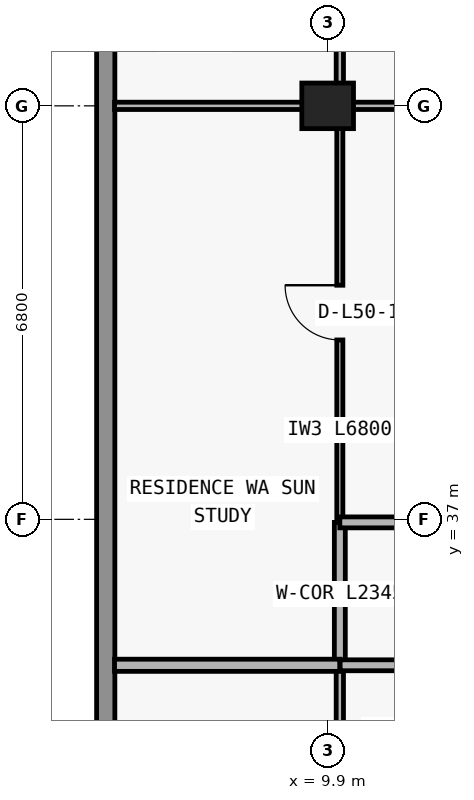
"""IFC4 building model, lengths in metres.
Left out: names, types, materials, properties, quantities, classifications, styles, units other than length and angle.
Written with IfcOpenShell. Run it as: python <this file> out.ifc"""

import sys

from ifc_helpers import new_model, si_unit, direction, frame, frame_2d, origin, origin_2d, place, context, subcontext, project, spatial, rectangle, extrude, element, fill, save


model = new_model("IFC4")
c1 = context("Model", 3, precision=1e-05, world=origin(), true_north=direction((0.0, 1.0)))
c2 = subcontext(c1, "Body", "Model", "MODEL_VIEW")
j1 = project(units=[si_unit("LENGTHUNIT", "METRE"), si_unit("PLANEANGLEUNIT", "RADIAN")], contexts=[c1])
p1 = place(None, origin())
s1 = spatial("IfcSite", under=j1, at=p1, CompositionType="ELEMENT")
p2 = place(p1, origin())
s2 = spatial("IfcBuilding", under=s1, at=p2, CompositionType="ELEMENT")
p3 = place(p2, frame((0.0, 0.0, 180.3)))
s3 = spatial("IfcBuildingStorey", under=s2, at=p3, CompositionType="ELEMENT", Elevation=180.3)
p4 = place(p3, frame((9.9, 43.8, 0.0), z_axis=(0.0, 0.0, 1.0), x_axis=(1.0, 0.0, 0.0)))
e1 = element("IfcColumn", 1, at=p4, inside=s3, PredefinedType="COLUMN", context=c2, shape_type="SweptSolid", body=[
    extrude(rectangle(XDim=0.85, YDim=0.75, at=origin_2d()), origin(), (0.0, 0.0, 1.0), 3.0),
])
p5 = place(p3, frame((6.25, 29.1, 0.0), z_axis=(0.0, 0.0, 1.0), x_axis=(0.0, 1.0, 0.0)))
e2 = element("IfcWall", 2, at=p5, inside=s3, PredefinedType="STANDARD", context=c2, shape_type="SweptSolid", body=[
    extrude(rectangle(XDim=17.9, YDim=0.3, at=frame_2d((8.95, 0.0))), origin(), (0.0, 0.0, 1.0), 3.0),
])
p6 = place(p3, frame((10.1, 30.34, 0.0), z_axis=(0.0, 0.0, 1.0), x_axis=(0.0, 1.0, 0.0)))
e3 = element("IfcWall", 3, at=p6, inside=s3, PredefinedType="PARTITIONING", context=c2, shape_type="SweptSolid", body=[
    extrude(rectangle(XDim=4.26, YDim=0.12, at=frame_2d((2.13, 0.0))), origin(), (0.0, 0.0, 1.0), 2.213),
])
p7 = place(p3, frame((10.1, 34.605, 0.0), z_axis=(0.0, 0.0, 1.0), x_axis=(0.0, 1.0, 0.0)))
e4 = element("IfcWall", 4, at=p7, inside=s3, PredefinedType="PARTITIONING", context=c2, shape_type="SweptSolid", body=[
    extrude(rectangle(XDim=2.345, YDim=0.18, at=frame_2d((1.172, 0.0))), origin(), (0.0, 0.0, 1.0), 2.213),
])
p8 = place(p3, frame((10.1, 37.0, 0.0), z_axis=(0.0, 0.0, 1.0), x_axis=(0.0, 1.0, 0.0)))
e5 = element("IfcWall", 5, at=p8, inside=s3, PredefinedType="MOVABLE", context=c2, shape_type="SweptSolid", body=[
    extrude(rectangle(XDim=6.8, YDim=0.1, at=frame_2d((3.4, 0.0))), origin(), (0.0, 0.0, 1.0), 2.213),
])
p9 = place(p8, frame((2.95, 0.0, 0.0)))
e6 = element("IfcOpeningElement", 6, at=p9, cuts=e5, PredefinedType="OPENING", context=c2, shape_type="SweptSolid", body=[
    extrude(rectangle(XDim=0.9, YDim=2.15, at=frame_2d((0.45, 1.075))), frame((0.0, 0.06, 0.0), z_axis=(0.0, -1.0, 0.0), x_axis=(1.0, 0.0, 0.0)), (0.0, 0.0, 1.0), 0.12),
])
p10 = place(p3, frame((10.1, 43.805, 0.0), z_axis=(0.0, 0.0, 1.0), x_axis=(0.0, 1.0, 0.0)))
e7 = element("IfcWall", 7, at=p10, inside=s3, PredefinedType="PARTITIONING", context=c2, shape_type="SweptSolid", body=[
    extrude(rectangle(XDim=3.075, YDim=0.12, at=frame_2d((1.538, 0.0))), origin(), (0.0, 0.0, 1.0), 3.0),
])
p11 = place(p10, frame((1.087, 0.0, 0.0)))
e8 = element("IfcOpeningElement", 8, at=p11, cuts=e7, PredefinedType="OPENING", context=c2, shape_type="SweptSolid", body=[
    extrude(rectangle(XDim=0.9, YDim=2.15, at=frame_2d((0.45, 1.075))), frame((0.0, 0.07, 0.0), z_axis=(0.0, -1.0, 0.0), x_axis=(1.0, 0.0, 0.0)), (0.0, 0.0, 1.0), 0.14),
])
p12 = place(p3, frame((6.395, 34.6, 0.0), z_axis=(0.0, 0.0, 1.0), x_axis=(1.0, 0.0, 0.0)))
e9 = element("IfcWall", 9, at=p12, inside=s3, PredefinedType="PARTITIONING", context=c2, shape_type="SweptSolid", body=[
    extrude(rectangle(XDim=3.705, YDim=0.2, at=frame_2d((1.853, 0.0))), origin(), (0.0, 0.0, 1.0), 3.0),
])
p13 = place(p3, frame((10.105, 34.6, 0.0), z_axis=(0.0, 0.0, 1.0), x_axis=(1.0, 0.0, 0.0)))
e10 = element("IfcWall", 10, at=p13, inside=s3, PredefinedType="PARTITIONING", context=c2, shape_type="SweptSolid", body=[
    extrude(rectangle(XDim=8.145, YDim=0.18, at=frame_2d((4.073, 0.0))), origin(), (0.0, 0.0, 1.0), 3.0),
])
p14 = place(p13, frame((2.388, 0.0, 0.0)))
e11 = element("IfcOpeningElement", 11, at=p14, cuts=e10, PredefinedType="OPENING", context=c2, shape_type="SweptSolid", body=[
    extrude(rectangle(XDim=1.0, YDim=2.2, at=frame_2d((0.5, 1.1))), frame((0.0, 0.1, 0.0), z_axis=(0.0, -1.0, 0.0), x_axis=(1.0, 0.0, 0.0)), (0.0, 0.0, 1.0), 0.2),
])
p15 = place(p3, frame((10.1, 36.95, 0.0), z_axis=(0.0, 0.0, 1.0), x_axis=(1.0, 0.0, 0.0)))
e12 = element("IfcWall", 12, at=p15, inside=s3, PredefinedType="PARTITIONING", context=c2, shape_type="SweptSolid", body=[
    extrude(rectangle(XDim=7.845, YDim=0.18, at=frame_2d((3.922, 0.0))), origin(), (0.0, 0.0, 1.0), 3.0),
])
p16 = place(p15, frame((3.46, 0.0, 0.0)))
e13 = element("IfcOpeningElement", 13, at=p16, cuts=e12, PredefinedType="OPENING", context=c2, shape_type="SweptSolid", body=[
    extrude(rectangle(XDim=1.0, YDim=2.2, at=frame_2d((0.5, 1.1))), frame((0.0, 0.1, 0.0), z_axis=(0.0, -1.0, 0.0), x_axis=(1.0, 0.0, 0.0)), (0.0, 0.0, 1.0), 0.2),
])
p17 = place(p3, frame((6.395, 43.8, 0.0), z_axis=(0.0, 0.0, 1.0), x_axis=(1.0, 0.0, 0.0)))
e14 = element("IfcWall", 14, at=p17, inside=s3, PredefinedType="PARTITIONING", context=c2, shape_type="SweptSolid", body=[
    extrude(rectangle(XDim=11.56, YDim=0.12, at=frame_2d((5.78, 0.0))), origin(), (0.0, 0.0, 1.0), 2.368),
])
p18 = place(p17, frame((7.215, 0.0, 0.0)))
e15 = element("IfcOpeningElement", 15, at=p18, cuts=e14, PredefinedType="OPENING", context=c2, shape_type="SweptSolid", body=[
    extrude(rectangle(XDim=0.9, YDim=2.15, at=frame_2d((0.45, 1.075))), frame((0.0, 0.07, 0.0), z_axis=(0.0, -1.0, 0.0), x_axis=(1.0, 0.0, 0.0)), (0.0, 0.0, 1.0), 0.14),
])
p19 = place(p17, frame((9.958, 0.0, 0.0)))
e16 = element("IfcOpeningElement", 16, at=p19, cuts=e14, PredefinedType="OPENING", context=c2, shape_type="SweptSolid", body=[
    extrude(rectangle(XDim=0.85, YDim=2.1, at=frame_2d((0.425, 1.05))), frame((0.0, 0.07, 0.0), z_axis=(0.0, -1.0, 0.0), x_axis=(1.0, 0.0, 0.0)), (0.0, 0.0, 1.0), 0.14),
])
p20 = place(p9, origin())
e17 = element("IfcDoor", 17, at=p20, inside=s3, OperationType="SINGLE_SWING_RIGHT", PredefinedType="DOOR", context=c2, shape_type="SweptSolid", body=[
    extrude(rectangle(XDim=0.9, YDim=2.15, at=frame_2d((0.45, 1.075))), frame((0.0, 0.025, 0.0), z_axis=(0.0, -1.0, 0.0), x_axis=(1.0, 0.0, 0.0)), (0.0, 0.0, 1.0), 0.05),
])
fill(e6, e17)
save(model, sys.argv[1])
